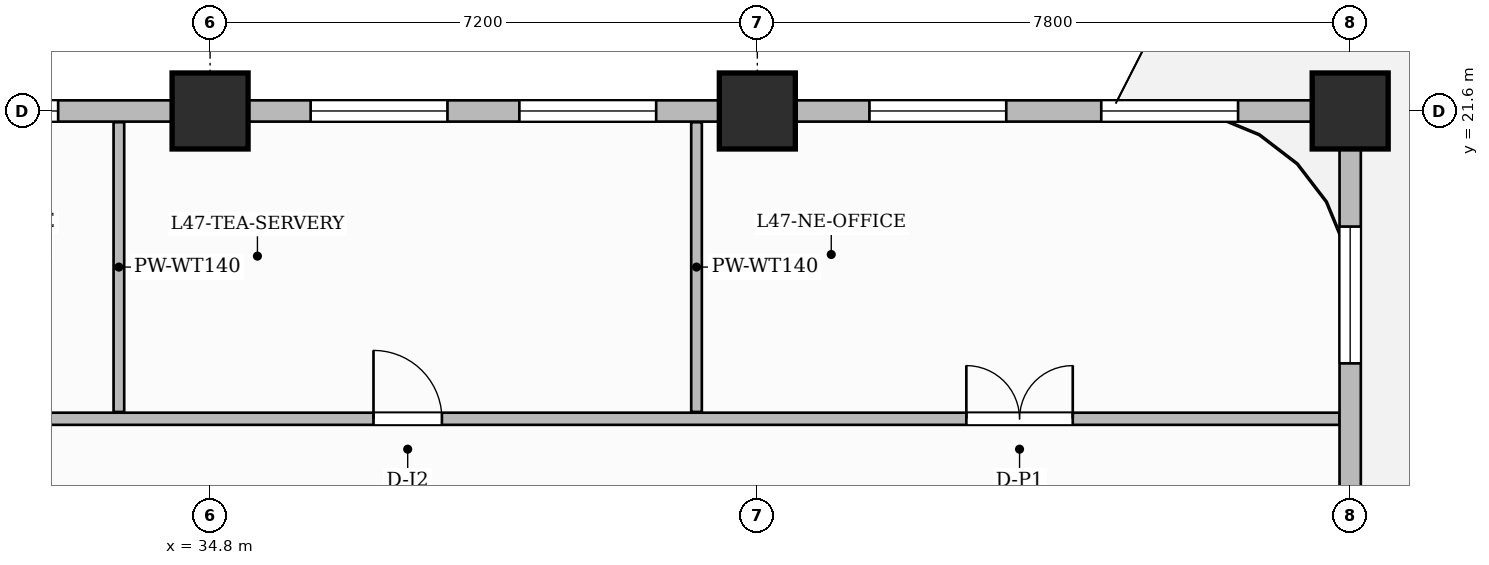
"""IFC4 building model, lengths in metres.
Left out: names, types, materials, properties, quantities, classifications, styles, units other than length and angle.
Written with IfcOpenShell. Run it as: python <this file> out.ifc"""

import sys

from ifc_helpers import new_model, si_unit, direction, frame, frame_2d, origin, origin_2d, place, context, subcontext, project, spatial, rectangle, extrude, source, transform, mapped, element, fill, save


model = new_model("IFC4")
c1 = context("Model", 3, precision=1e-05, world=origin(), true_north=direction((0.0, 1.0)))
c2 = subcontext(c1, "Body", "Model", "MODEL_VIEW")
j1 = project(units=[si_unit("LENGTHUNIT", "METRE"), si_unit("PLANEANGLEUNIT", "RADIAN")], contexts=[c1])
p1 = place(None, origin())
s1 = spatial("IfcSite", under=j1, at=p1, CompositionType="ELEMENT")
p2 = place(p1, origin())
s2 = spatial("IfcBuilding", under=s1, at=p2, CompositionType="ELEMENT")
p3 = place(p2, frame((0.0, 0.0, 188.8)))
s3 = spatial("IfcBuildingStorey", under=s2, at=p3, CompositionType="ELEMENT", Elevation=188.8)
m1 = source(origin(), c2, "Body", "SweptSolid", [
    extrude(rectangle(XDim=1.0, YDim=1.0, at=origin_2d()), origin(), (0.0, 0.0, 1.0), 3.85),
])
for number, where, z_axis, x_axis in (
    (1, (34.8, 21.6, 0.0), (0.0, 0.0, 1.0), (1.0, 0.0, 0.0)),
    (2, (42.0, 21.6, 0.0), (0.0, 0.0, 1.0), (1.0, 0.0, 0.0)),
    (3, (49.8, 21.6, 0.0), (0.0, 0.0, 1.0), (1.0, 0.0, 0.0)),
):
    element("IfcColumn", number, at=place(p3, frame(where, z_axis=z_axis, x_axis=x_axis)), inside=s3, PredefinedType="COLUMN", context=c2, shape_type="MappedRepresentation", body=[
        mapped(m1, transform((0.0, 0.0, 0.0), scale=1.0)),
    ])
p4 = place(p3, frame((30.29, 17.55, 0.0), z_axis=(0.0, 0.0, 1.0), x_axis=(1.0, 0.0, 0.0)))
e4 = element("IfcWall", 4, at=p4, inside=s3, PredefinedType="PARTITIONING", context=c2, shape_type="SweptSolid", body=[
    extrude(rectangle(XDim=19.37, YDim=0.16, at=frame_2d((9.685, 0.0))), origin(), (0.0, 0.0, 1.0), 3.6),
])
p5 = place(p4, frame((1.185, 0.0, 0.0)))
e5 = element("IfcOpeningElement", 5, at=p5, cuts=e4, PredefinedType="OPENING", context=c2, shape_type="SweptSolid", body=[
    extrude(rectangle(XDim=0.85, YDim=2.1, at=frame_2d((0.425, 1.05))), frame((0.0, 0.09, 0.0), z_axis=(0.0, -1.0, 0.0), x_axis=(1.0, 0.0, 0.0)), (0.0, 0.0, 1.0), 0.18),
])
p6 = place(p4, frame((6.66, 0.0, 0.0)))
e6 = element("IfcOpeningElement", 6, at=p6, cuts=e4, PredefinedType="OPENING", context=c2, shape_type="SweptSolid", body=[
    extrude(rectangle(XDim=0.9, YDim=2.15, at=frame_2d((0.45, 1.075))), frame((0.0, 0.09, 0.0), z_axis=(0.0, -1.0, 0.0), x_axis=(1.0, 0.0, 0.0)), (0.0, 0.0, 1.0), 0.18),
])
p7 = place(p4, frame((14.46, 0.0, 0.0)))
e7 = element("IfcOpeningElement", 7, at=p7, cuts=e4, PredefinedType="OPENING", context=c2, shape_type="SweptSolid", body=[
    extrude(rectangle(XDim=1.4, YDim=2.35, at=frame_2d((0.7, 1.175))), frame((0.0, 0.09, 0.0), z_axis=(0.0, -1.0, 0.0), x_axis=(1.0, 0.0, 0.0)), (0.0, 0.0, 1.0), 0.18),
])
for number, where, z_axis, x_axis in (
    (8, (33.6, 17.64, 0.0), (0.0, 0.0, 1.0), (0.0, 1.0, 0.0)),
    (9, (41.2, 17.64, 0.0), (0.0, 0.0, 1.0), (0.0, 1.0, 0.0)),
):
    element("IfcWall", number, at=place(p3, frame(where, z_axis=z_axis, x_axis=x_axis)), inside=s3, PredefinedType="PARTITIONING", context=c2, shape_type="SweptSolid", body=[
        extrude(rectangle(XDim=3.812, YDim=0.14, at=frame_2d((1.906, 0.0))), origin(), (0.0, 0.0, 1.0), 3.6),
    ])
p8 = place(p3, frame((49.8, 14.62, 0.0), z_axis=(0.0, 0.0, 1.0), x_axis=(0.0, 1.0, 0.0)))
e10 = element("IfcWall", 10, at=p8, inside=s3, PredefinedType="SOLIDWALL", context=c2, shape_type="SweptSolid", body=[
    extrude(rectangle(XDim=6.93, YDim=0.28, at=frame_2d((3.465, 0.0))), origin(), (0.0, 0.0, 1.0), 3.085),
])
p9 = place(p8, frame((0.42, 0.0, 0.0)))
e11 = element("IfcOpeningElement", 11, at=p9, cuts=e10, PredefinedType="OPENING", context=c2, shape_type="SweptSolid", body=[
    extrude(rectangle(XDim=1.2, YDim=2.2, at=frame_2d((0.6, 1.1))), frame((0.0, 0.15, 0.0), z_axis=(0.0, -1.0, 0.0), x_axis=(1.0, 0.0, 0.0)), (0.0, 0.0, 1.0), 0.3),
])
p10 = place(p8, frame((3.659, 0.0, 0.8)))
e12 = element("IfcOpeningElement", 12, at=p10, cuts=e10, PredefinedType="OPENING", context=c2, shape_type="SweptSolid", body=[
    extrude(rectangle(XDim=1.8, YDim=1.85, at=frame_2d((0.9, 0.925))), frame((0.0, 0.15, 0.0), z_axis=(0.0, -1.0, 0.0), x_axis=(1.0, 0.0, 0.0)), (0.0, 0.0, 1.0), 0.3),
])
p11 = place(p3, frame((18.0, 21.6, 0.0), z_axis=(0.0, 0.0, 1.0), x_axis=(1.0, 0.0, 0.0)))
e13 = element("IfcWall", 13, at=p11, inside=s3, PredefinedType="SOLIDWALL", context=c2, shape_type="SweptSolid", body=[
    extrude(rectangle(XDim=31.8, YDim=0.28, at=frame_2d((15.9, 0.0))), origin(), (0.0, 0.0, 1.0), 3.085),
])
p12 = place(p11, frame((0.885, 0.0, 0.8)))
e14 = element("IfcOpeningElement", 14, at=p12, cuts=e13, PredefinedType="OPENING", context=c2, shape_type="SweptSolid", body=[
    extrude(rectangle(XDim=1.4, YDim=1.85, at=frame_2d((0.7, 0.925))), frame((0.0, 0.15, 0.0), z_axis=(0.0, -1.0, 0.0), x_axis=(1.0, 0.0, 0.0)), (0.0, 0.0, 1.0), 0.3),
])
p13 = place(p11, frame((4.581, 0.0, 0.8)))
e15 = element("IfcOpeningElement", 15, at=p13, cuts=e13, PredefinedType="OPENING", context=c2, shape_type="SweptSolid", body=[
    extrude(rectangle(XDim=0.95, YDim=1.75, at=frame_2d((0.475, 0.875))), frame((0.0, 0.15, 0.0), z_axis=(0.0, -1.0, 0.0), x_axis=(1.0, 0.0, 0.0)), (0.0, 0.0, 1.0), 0.3),
])
p14 = place(p11, frame((6.964, 0.0, 0.8)))
e16 = element("IfcOpeningElement", 16, at=p14, cuts=e13, PredefinedType="OPENING", context=c2, shape_type="SweptSolid", body=[
    extrude(rectangle(XDim=1.8, YDim=1.85, at=frame_2d((0.9, 0.925))), frame((0.0, 0.15, 0.0), z_axis=(0.0, -1.0, 0.0), x_axis=(1.0, 0.0, 0.0)), (0.0, 0.0, 1.0), 0.3),
])
p15 = place(p11, frame((13.001, 0.0, 0.8)))
e17 = element("IfcOpeningElement", 17, at=p15, cuts=e13, PredefinedType="OPENING", context=c2, shape_type="SweptSolid", body=[
    extrude(rectangle(XDim=1.8, YDim=1.85, at=frame_2d((0.9, 0.925))), frame((0.0, 0.15, 0.0), z_axis=(0.0, -1.0, 0.0), x_axis=(1.0, 0.0, 0.0)), (0.0, 0.0, 1.0), 0.3),
])
p16 = place(p11, frame((18.123, 0.0, 0.8)))
e18 = element("IfcOpeningElement", 18, at=p16, cuts=e13, PredefinedType="OPENING", context=c2, shape_type="SweptSolid", body=[
    extrude(rectangle(XDim=1.8, YDim=1.85, at=frame_2d((0.9, 0.925))), frame((0.0, 0.15, 0.0), z_axis=(0.0, -1.0, 0.0), x_axis=(1.0, 0.0, 0.0)), (0.0, 0.0, 1.0), 0.3),
])
p17 = place(p11, frame((20.869, 0.0, 0.8)))
e19 = element("IfcOpeningElement", 19, at=p17, cuts=e13, PredefinedType="OPENING", context=c2, shape_type="SweptSolid", body=[
    extrude(rectangle(XDim=1.8, YDim=1.85, at=frame_2d((0.9, 0.925))), frame((0.0, 0.15, 0.0), z_axis=(0.0, -1.0, 0.0), x_axis=(1.0, 0.0, 0.0)), (0.0, 0.0, 1.0), 0.3),
])
p18 = place(p11, frame((25.475, 0.0, 0.8)))
e20 = element("IfcOpeningElement", 20, at=p18, cuts=e13, PredefinedType="OPENING", context=c2, shape_type="SweptSolid", body=[
    extrude(rectangle(XDim=1.8, YDim=1.85, at=frame_2d((0.9, 0.925))), frame((0.0, 0.15, 0.0), z_axis=(0.0, -1.0, 0.0), x_axis=(1.0, 0.0, 0.0)), (0.0, 0.0, 1.0), 0.3),
])
p19 = place(p11, frame((28.525, 0.0, 0.8)))
e21 = element("IfcOpeningElement", 21, at=p19, cuts=e13, PredefinedType="OPENING", context=c2, shape_type="SweptSolid", body=[
    extrude(rectangle(XDim=1.8, YDim=1.85, at=frame_2d((0.9, 0.925))), frame((0.0, 0.15, 0.0), z_axis=(0.0, -1.0, 0.0), x_axis=(1.0, 0.0, 0.0)), (0.0, 0.0, 1.0), 0.3),
])
m2 = source(origin(), c2, "Body", "SweptSolid", [
    extrude(rectangle(XDim=0.9, YDim=2.15, at=frame_2d((0.45, 1.075))), frame((0.0, 0.025, 0.0), z_axis=(0.0, -1.0, 0.0), x_axis=(1.0, 0.0, 0.0)), (0.0, 0.0, 1.0), 0.05),
])
p20 = place(p6, origin())
e22 = element("IfcDoor", 22, at=p20, inside=s3, OperationType="SINGLE_SWING_LEFT", PredefinedType="DOOR", context=c2, shape_type="MappedRepresentation", body=[
    mapped(m2, transform((0.0, 0.0, 0.0), scale=1.0)),
])
fill(e6, e22)
m3 = source(origin(), c2, "Body", "SweptSolid", [
    extrude(rectangle(XDim=1.4, YDim=2.35, at=frame_2d((0.7, 1.175))), frame((0.0, 0.025, 0.0), z_axis=(0.0, -1.0, 0.0), x_axis=(1.0, 0.0, 0.0)), (0.0, 0.0, 1.0), 0.05),
])
p21 = place(p7, origin())
e23 = element("IfcDoor", 23, at=p21, inside=s3, OperationType="DOUBLE_DOOR_SINGLE_SWING", PredefinedType="DOOR", context=c2, shape_type="MappedRepresentation", body=[
    mapped(m3, transform((0.0, 0.0, 0.0), scale=1.0)),
])
fill(e7, e23)
m4 = source(origin(), c2, "Body", "SweptSolid", [
    extrude(rectangle(XDim=1.8, YDim=1.85, at=frame_2d((0.9, 0.925))), frame((0.0, 0.03, 0.0), z_axis=(0.0, -1.0, 0.0), x_axis=(1.0, 0.0, 0.0)), (0.0, 0.0, 1.0), 0.06),
])
p22 = place(p10, origin())
e24 = element("IfcWindow", 24, at=p22, inside=s3, PartitioningType="DOUBLE_PANEL_VERTICAL", PredefinedType="WINDOW", context=c2, shape_type="MappedRepresentation", body=[
    mapped(m4, transform((0.0, 0.0, 0.0), scale=1.0)),
])
fill(e12, e24)
p23 = place(p15, origin())
e25 = element("IfcWindow", 25, at=p23, inside=s3, PartitioningType="DOUBLE_PANEL_VERTICAL", PredefinedType="WINDOW", context=c2, shape_type="MappedRepresentation", body=[
    mapped(m4, transform((0.0, 0.0, 0.0), scale=1.0)),
])
fill(e17, e25)
p24 = place(p16, origin())
e26 = element("IfcWindow", 26, at=p24, inside=s3, PartitioningType="DOUBLE_PANEL_VERTICAL", PredefinedType="WINDOW", context=c2, shape_type="MappedRepresentation", body=[
    mapped(m4, transform((0.0, 0.0, 0.0), scale=1.0)),
])
fill(e18, e26)
p25 = place(p17, origin())
e27 = element("IfcWindow", 27, at=p25, inside=s3, PartitioningType="DOUBLE_PANEL_VERTICAL", PredefinedType="WINDOW", context=c2, shape_type="MappedRepresentation", body=[
    mapped(m4, transform((0.0, 0.0, 0.0), scale=1.0)),
])
fill(e19, e27)
p26 = place(p18, origin())
e28 = element("IfcWindow", 28, at=p26, inside=s3, PartitioningType="DOUBLE_PANEL_VERTICAL", PredefinedType="WINDOW", context=c2, shape_type="MappedRepresentation", body=[
    mapped(m4, transform((0.0, 0.0, 0.0), scale=1.0)),
])
fill(e20, e28)
p27 = place(p19, origin())
e29 = element("IfcWindow", 29, at=p27, inside=s3, PartitioningType="DOUBLE_PANEL_VERTICAL", PredefinedType="WINDOW", context=c2, shape_type="MappedRepresentation", body=[
    mapped(m4, transform((0.0, 0.0, 0.0), scale=1.0)),
])
fill(e21, e29)
save(model, sys.argv[1])
